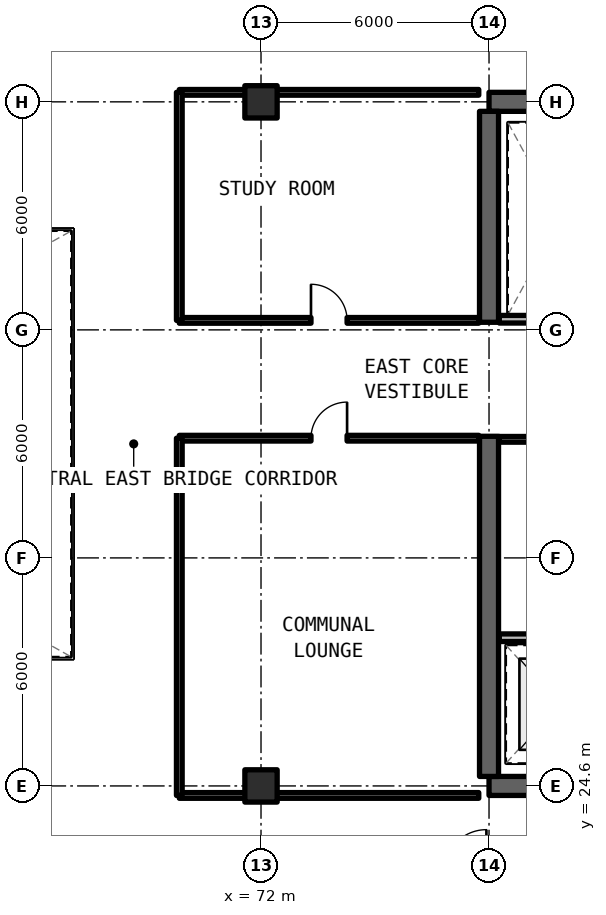
"""IFC4 building model, lengths in metres.
Left out: names, types, materials, properties, quantities, classifications, styles, units other than length and angle.
Written with IfcOpenShell. Run it as: python <this file> out.ifc"""

import sys

from ifc_helpers import new_model, si_unit, direction, frame, frame_2d, origin, origin_2d, place, context, subcontext, project, spatial, rectangle, extrude, element, fill, save


model = new_model("IFC4")
c1 = context("Model", 3, precision=1e-05, world=origin(), true_north=direction((0.0, 1.0)))
c2 = subcontext(c1, "Body", "Model", "MODEL_VIEW")
j1 = project(units=[si_unit("LENGTHUNIT", "METRE"), si_unit("PLANEANGLEUNIT", "RADIAN")], contexts=[c1])
p1 = place(None, origin())
s1 = spatial("IfcSite", under=j1, at=p1, CompositionType="ELEMENT")
p2 = place(p1, origin())
s2 = spatial("IfcBuilding", under=s1, at=p2, CompositionType="ELEMENT")
p3 = place(p2, frame((0.0, 0.0, 155.1)))
s3 = spatial("IfcBuildingStorey", under=s2, at=p3, CompositionType="ELEMENT", Elevation=155.1)
for number, where, z_axis, x_axis in (
    (1, (78.0, 24.6, 0.0), (0.0, 0.0, 1.0), (1.0, 0.0, 0.0)),
    (2, (90.0, 42.6, 0.0), (0.0, 0.0, 1.0), (-1.0, 0.0, 0.0)),
):
    element("IfcWall", number, at=place(p3, frame(where, z_axis=z_axis, x_axis=x_axis)), inside=s3, PredefinedType="SHEAR", context=c2, shape_type="SweptSolid", body=[
        extrude(rectangle(XDim=12.0, YDim=0.5, at=frame_2d((6.0, 0.0))), origin(), (0.0, 0.0, 1.0), 3.3),
    ])
p4 = place(p3, frame((78.0, 24.85, 0.0), z_axis=(0.0, 0.0, 1.0), x_axis=(0.0, 1.0, 0.0)))
e3 = element("IfcWall", 3, at=p4, inside=s3, PredefinedType="SHEAR", context=c2, shape_type="SweptSolid", body=[
    extrude(rectangle(XDim=8.95, YDim=0.5, at=frame_2d((4.475, 0.0))), origin(), (0.0, 0.0, 1.0), 3.3),
])
p5 = place(p3, frame((78.0, 36.8, 0.0), z_axis=(0.0, 0.0, 1.0), x_axis=(0.0, 1.0, 0.0)))
e4 = element("IfcWall", 4, at=p5, inside=s3, PredefinedType="SHEAR", context=c2, shape_type="SweptSolid", body=[
    extrude(rectangle(XDim=5.55, YDim=0.5, at=frame_2d((2.775, 0.0))), origin(), (0.0, 0.0, 1.0), 3.3),
])
for number, where, z_axis, x_axis in (
    (5, (72.0, 24.6, 0.0), (0.0, 0.0, 1.0), (1.0, 0.0, 0.0)),
    (6, (72.0, 42.6, 0.0), (0.0, 0.0, 1.0), (1.0, 0.0, 0.0)),
):
    element("IfcColumn", number, at=place(p3, frame(where, z_axis=z_axis, x_axis=x_axis)), inside=s3, PredefinedType="COLUMN", context=c2, shape_type="SweptSolid", body=[
        extrude(rectangle(XDim=0.85, YDim=0.85, at=origin_2d()), origin(), (0.0, 0.0, 1.0), 3.3),
    ])
p6 = place(p3, frame((78.27, 28.5, 0.0), z_axis=(0.0, 0.0, 1.0), x_axis=(1.0, 0.0, 0.0)))
e7 = element("IfcWall", 7, at=p6, inside=s3, PredefinedType="SOLIDWALL", context=c2, shape_type="SweptSolid", body=[
    extrude(rectangle(XDim=7.51, YDim=0.2, at=frame_2d((3.755, 0.0))), origin(), (0.0, 0.0, 1.0), 2.35),
])
p7 = place(p6, frame((3.53, 0.0, 0.0)))
e8 = element("IfcOpeningElement", 8, at=p7, cuts=e7, PredefinedType="OPENING", context=c2, shape_type="SweptSolid", body=[
    extrude(rectangle(XDim=1.0, YDim=2.15, at=frame_2d((0.5, 1.075))), frame((0.0, 0.11, 0.0), z_axis=(0.0, -1.0, 0.0), x_axis=(1.0, 0.0, 0.0)), (0.0, 0.0, 1.0), 0.22),
])
p8 = place(p3, frame((78.27, 33.72, 0.0), z_axis=(0.0, 0.0, 1.0), x_axis=(1.0, 0.0, 0.0)))
e9 = element("IfcWall", 9, at=p8, inside=s3, PredefinedType="SOLIDWALL", context=c2, shape_type="SweptSolid", body=[
    extrude(rectangle(XDim=3.05, YDim=0.15, at=frame_2d((1.525, 0.0))), origin(), (0.0, 0.0, 1.0), 2.35),
])
p9 = place(p3, frame((78.27, 36.88, 0.0), z_axis=(0.0, 0.0, 1.0), x_axis=(1.0, 0.0, 0.0)))
e10 = element("IfcWall", 10, at=p9, inside=s3, PredefinedType="SOLIDWALL", context=c2, shape_type="SweptSolid", body=[
    extrude(rectangle(XDim=3.05, YDim=0.2, at=frame_2d((1.525, 0.0))), origin(), (0.0, 0.0, 1.0), 2.35),
])
p10 = place(p3, frame((69.85, 24.35, 0.0), z_axis=(0.0, 0.0, 1.0), x_axis=(1.0, 0.0, 0.0)))
e11 = element("IfcWall", 11, at=p10, inside=s3, PredefinedType="SOLIDWALL", context=c2, shape_type="SweptSolid", body=[
    extrude(rectangle(XDim=7.88, YDim=0.15, at=frame_2d((3.94, 0.0))), origin(), (0.0, 0.0, 1.0), 2.35),
])
p11 = place(p3, frame((69.85, 33.75, 0.0), z_axis=(0.0, 0.0, 1.0), x_axis=(1.0, 0.0, 0.0)))
e12 = element("IfcWall", 12, at=p11, inside=s3, PredefinedType="SOLIDWALL", context=c2, shape_type="SweptSolid", body=[
    extrude(rectangle(XDim=7.88, YDim=0.15, at=frame_2d((3.94, 0.0))), origin(), (0.0, 0.0, 1.0), 2.35),
])
p12 = place(p11, frame((3.465, 0.0, 0.0)))
e13 = element("IfcOpeningElement", 13, at=p12, cuts=e12, PredefinedType="OPENING", context=c2, shape_type="SweptSolid", body=[
    extrude(rectangle(XDim=0.95, YDim=2.15, at=frame_2d((0.475, 1.075))), frame((0.0, 0.085, 0.0), z_axis=(0.0, -1.0, 0.0), x_axis=(1.0, 0.0, 0.0)), (0.0, 0.0, 1.0), 0.17),
])
p13 = place(p3, frame((69.85, 24.35, 0.0), z_axis=(0.0, 0.0, 1.0), x_axis=(0.0, 1.0, 0.0)))
e14 = element("IfcWall", 14, at=p13, inside=s3, PredefinedType="SOLIDWALL", context=c2, shape_type="SweptSolid", body=[
    extrude(rectangle(XDim=9.4, YDim=0.15, at=frame_2d((4.7, 0.0))), origin(), (0.0, 0.0, 1.0), 2.35),
])
p14 = place(p3, frame((69.85, 36.85, 0.0), z_axis=(0.0, 0.0, 1.0), x_axis=(1.0, 0.0, 0.0)))
e15 = element("IfcWall", 15, at=p14, inside=s3, PredefinedType="SOLIDWALL", context=c2, shape_type="SweptSolid", body=[
    extrude(rectangle(XDim=7.88, YDim=0.15, at=frame_2d((3.94, 0.0))), origin(), (0.0, 0.0, 1.0), 2.35),
])
p15 = place(p14, frame((3.465, 0.0, 0.0)))
e16 = element("IfcOpeningElement", 16, at=p15, cuts=e15, PredefinedType="OPENING", context=c2, shape_type="SweptSolid", body=[
    extrude(rectangle(XDim=0.95, YDim=2.15, at=frame_2d((0.475, 1.075))), frame((0.0, 0.085, 0.0), z_axis=(0.0, -1.0, 0.0), x_axis=(1.0, 0.0, 0.0)), (0.0, 0.0, 1.0), 0.17),
])
p16 = place(p3, frame((69.85, 42.85, 0.0), z_axis=(0.0, 0.0, 1.0), x_axis=(1.0, 0.0, 0.0)))
e17 = element("IfcWall", 17, at=p16, inside=s3, PredefinedType="SOLIDWALL", context=c2, shape_type="SweptSolid", body=[
    extrude(rectangle(XDim=7.88, YDim=0.15, at=frame_2d((3.94, 0.0))), origin(), (0.0, 0.0, 1.0), 2.35),
])
p17 = place(p3, frame((69.85, 36.85, 0.0), z_axis=(0.0, 0.0, 1.0), x_axis=(0.0, 1.0, 0.0)))
e18 = element("IfcWall", 18, at=p17, inside=s3, PredefinedType="SOLIDWALL", context=c2, shape_type="SweptSolid", body=[
    extrude(rectangle(XDim=6.0, YDim=0.15, at=frame_2d((3.0, 0.0))), origin(), (0.0, 0.0, 1.0), 2.35),
])
p18 = place(p12, origin())
e19 = element("IfcDoor", 19, at=p18, inside=s3, OperationType="SINGLE_SWING_RIGHT", PredefinedType="DOOR", context=c2, shape_type="SweptSolid", body=[
    extrude(rectangle(XDim=0.95, YDim=2.15, at=frame_2d((0.475, 1.075))), frame((0.0, 0.025, 0.0), z_axis=(0.0, -1.0, 0.0), x_axis=(1.0, 0.0, 0.0)), (0.0, 0.0, 1.0), 0.05),
])
fill(e13, e19)
p19 = place(p15, origin())
e20 = element("IfcDoor", 20, at=p19, inside=s3, OperationType="SINGLE_SWING_LEFT", PredefinedType="DOOR", context=c2, shape_type="SweptSolid", body=[
    extrude(rectangle(XDim=0.95, YDim=2.15, at=frame_2d((0.475, 1.075))), frame((0.0, 0.025, 0.0), z_axis=(0.0, -1.0, 0.0), x_axis=(1.0, 0.0, 0.0)), (0.0, 0.0, 1.0), 0.05),
])
fill(e16, e20)
save(model, sys.argv[1])
